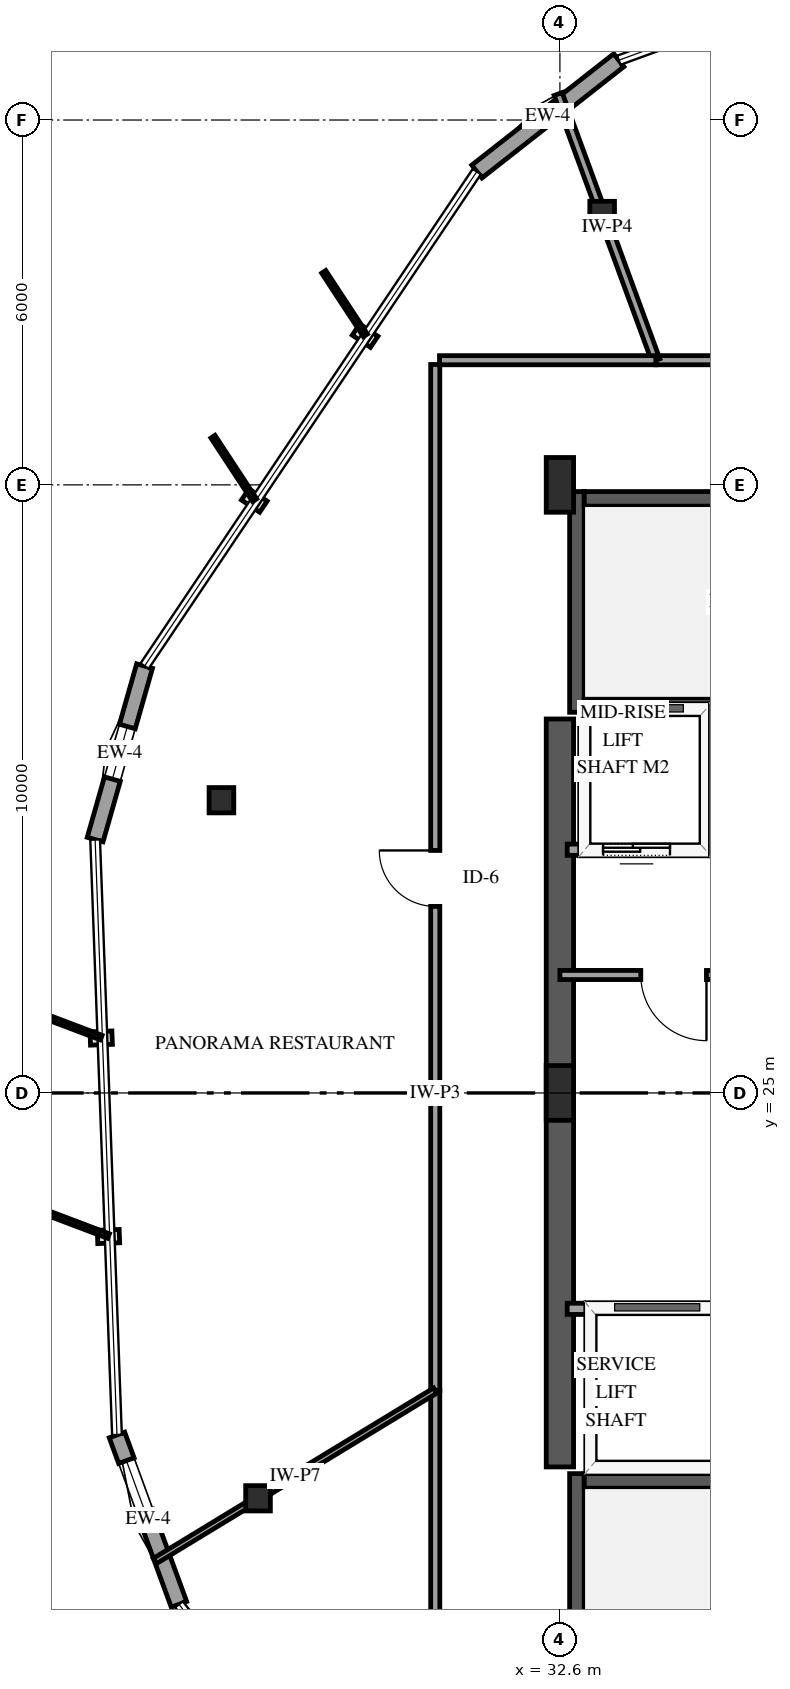
"""IFC4 building model, lengths in metres.
Left out: names, types, materials, properties, quantities, classifications, styles, units other than length and angle.
Written with IfcOpenShell. Run it as: python <this file> out.ifc"""

import sys

from ifc_helpers import new_model, si_unit, direction, frame, frame_2d, origin, origin_2d, place, context, subcontext, project, spatial, rectangle, i_section, extrude, element, fill, save


model = new_model("IFC4")
c1 = context("Model", 3, precision=1e-05, world=origin(), true_north=direction((0.0, 1.0)))
c2 = subcontext(c1, "Body", "Model", "MODEL_VIEW")
j1 = project(units=[si_unit("LENGTHUNIT", "METRE"), si_unit("PLANEANGLEUNIT", "RADIAN")], contexts=[c1])
p1 = place(None, origin())
s1 = spatial("IfcSite", under=j1, at=p1, CompositionType="ELEMENT")
p2 = place(p1, origin())
s2 = spatial("IfcBuilding", under=s1, at=p2, CompositionType="ELEMENT")
p3 = place(p2, frame((0.0, 0.0, 237.4)))
s3 = spatial("IfcBuildingStorey", under=s2, at=p3, CompositionType="ELEMENT", Elevation=237.4)
p4 = place(p3, frame((32.88, 15.11, 0.0), z_axis=(0.0, 0.0, 1.0), x_axis=(0.0, 1.0, 0.0)))
e1 = element("IfcWall", 1, at=p4, inside=s3, PredefinedType="SHEAR", context=c2, shape_type="SweptSolid", body=[
    extrude(rectangle(XDim=3.63, YDim=0.24, at=frame_2d((1.815, 0.0))), origin(), (0.0, 0.0, 1.0), 5.1),
])
p5 = place(p3, frame((33.0, 18.62, 0.0), z_axis=(0.0, 0.0, 1.0), x_axis=(1.0, 0.0, 0.0)))
e2 = element("IfcWall", 2, at=p5, inside=s3, PredefinedType="SHEAR", context=c2, shape_type="SweptSolid", body=[
    extrude(rectangle(XDim=8.0, YDim=0.24, at=frame_2d((4.0, 0.0))), origin(), (0.0, 0.0, 1.0), 5.1),
])
p6 = place(p3, frame((32.88, 31.26, 0.0), z_axis=(0.0, 0.0, 1.0), x_axis=(0.0, 1.0, 0.0)))
e3 = element("IfcWall", 3, at=p6, inside=s3, PredefinedType="SHEAR", context=c2, shape_type="SweptSolid", body=[
    extrude(rectangle(XDim=3.63, YDim=0.24, at=frame_2d((1.815, 0.0))), origin(), (0.0, 0.0, 1.0), 5.1),
])
for number, where, z_axis, x_axis in (
    (4, (33.0, 31.38, 0.0), (0.0, 0.0, 1.0), (1.0, 0.0, 0.0)),
    (5, (33.0, 34.77, 0.0), (0.0, 0.0, 1.0), (1.0, 0.0, 0.0)),
):
    element("IfcWall", number, at=place(p3, frame(where, z_axis=z_axis, x_axis=x_axis)), inside=s3, PredefinedType="SHEAR", context=c2, shape_type="SweptSolid", body=[
        extrude(rectangle(XDim=8.0, YDim=0.24, at=frame_2d((4.0, 0.0))), origin(), (0.0, 0.0, 1.0), 5.1),
    ])
p7 = place(p3, frame((32.6, 18.85, 0.0), z_axis=(0.0, 0.0, 1.0), x_axis=(0.0, 1.0, 0.0)))
e6 = element("IfcWall", 6, at=p7, inside=s3, PredefinedType="SHEAR", context=c2, shape_type="SweptSolid", body=[
    extrude(rectangle(XDim=12.3, YDim=0.45, at=frame_2d((6.15, 0.0))), origin(), (0.0, 0.0, 1.0), 5.1),
])
for number, where, z_axis, x_axis in (
    (7, (32.6, 25.0, 0.0), (0.0, 0.0, 1.0), (1.0, 0.0, 0.0)),
    (8, (32.6, 35.0, 0.0), (0.0, 0.0, 1.0), (1.0, 0.0, 0.0)),
):
    element("IfcColumn", number, at=place(p3, frame(where, z_axis=z_axis, x_axis=x_axis)), inside=s3, PredefinedType="PILASTER", context=c2, shape_type="SweptSolid", body=[
        extrude(rectangle(XDim=0.45, YDim=0.9, at=origin_2d()), origin(), (0.0, 0.0, 1.0), 4.8),
    ])
for number, where, z_axis, x_axis in (
    (9, (33.295, 39.455, 0.0), (0.0, 0.0, 1.0), (1.0, 0.0, 0.0)),
    (10, (27.034, 29.814, 0.0), (0.0, 0.0, 1.0), (1.0, 0.0, 0.0)),
    (11, (27.635, 18.334, 0.0), (0.0, 0.0, 1.0), (1.0, 0.0, 0.0)),
):
    element("IfcColumn", number, at=place(p3, frame(where, z_axis=z_axis, x_axis=x_axis)), inside=s3, PredefinedType="COLUMN", context=c2, shape_type="SweptSolid", body=[
        extrude(i_section(OverallWidth=0.406, OverallDepth=0.416, WebThickness=0.03, FlangeThickness=0.048, FilletRadius=0.038, at=origin_2d()), origin(), (0.0, 0.0, 1.0), 4.8),
    ])
p8 = place(p3, frame((33.569, 41.983, 0.0), z_axis=(0.0, 0.0, 1.0), x_axis=(-0.78691766732, -0.617058007694, 0.0)))
e12 = element("IfcWall", 12, at=p8, inside=s3, PredefinedType="SOLIDWALL", context=c2, shape_type="SweptSolid", body=[
    extrude(rectangle(XDim=2.967, YDim=0.27, at=frame_2d((1.483, 0.0))), origin(), (0.0, 0.0, 1.0), 4.179),
])
p9 = place(p3, frame((25.77, 32.02, 0.0), z_axis=(0.0, 0.0, 1.0), x_axis=(-0.27397104283, -0.961737941276, 0.0)))
e13 = element("IfcWall", 13, at=p9, inside=s3, PredefinedType="SOLIDWALL", context=c2, shape_type="SweptSolid", body=[
    extrude(rectangle(XDim=2.967, YDim=0.27, at=frame_2d((1.483, 0.0))), origin(), (0.0, 0.0, 1.0), 4.179),
])
p10 = place(p9, frame((1.033, 0.0, 0.75)))
e14 = element("IfcOpeningElement", 14, at=p10, cuts=e13, PredefinedType="OPENING", context=c2, shape_type="SweptSolid", body=[
    extrude(rectangle(XDim=0.9, YDim=1.5, at=frame_2d((0.45, 0.75))), frame((0.0, 0.145, 0.0), z_axis=(0.0, -1.0, 0.0), x_axis=(1.0, 0.0, 0.0)), (0.0, 0.0, 1.0), 0.29),
])
p11 = place(p3, frame((25.316, 19.376, 0.0), z_axis=(0.0, 0.0, 1.0), x_axis=(0.343572680233, -0.939126090255, 0.0)))
e15 = element("IfcWall", 15, at=p11, inside=s3, PredefinedType="SOLIDWALL", context=c2, shape_type="SweptSolid", body=[
    extrude(rectangle(XDim=2.967, YDim=0.27, at=frame_2d((1.483, 0.0))), origin(), (0.0, 0.0, 1.0), 4.179),
])
p12 = place(p11, frame((0.45, 0.0, 0.75)))
e16 = element("IfcOpeningElement", 16, at=p12, cuts=e15, PredefinedType="OPENING", context=c2, shape_type="SweptSolid", body=[
    extrude(rectangle(XDim=0.9, YDim=1.5, at=frame_2d((0.45, 0.75))), frame((0.0, 0.145, 0.0), z_axis=(0.0, -1.0, 0.0), x_axis=(1.0, 0.0, 0.0)), (0.0, 0.0, 1.0), 0.29),
])
p13 = place(p3, frame((32.72, 21.45, 0.0), z_axis=(0.0, 0.0, 1.0), x_axis=(1.0, 0.0, 0.0)))
e17 = element("IfcWall", 17, at=p13, inside=s3, PredefinedType="SOLIDWALL", context=c2, shape_type="SweptSolid", body=[
    extrude(rectangle(XDim=2.58, YDim=0.185, at=frame_2d((1.29, 0.0))), origin(), (0.0, 0.0, 1.0), 4.8),
])
p14 = place(p3, frame((32.72, 29.0, 0.0), z_axis=(0.0, 0.0, 1.0), x_axis=(1.0, 0.0, 0.0)))
e18 = element("IfcWall", 18, at=p14, inside=s3, PredefinedType="SOLIDWALL", context=c2, shape_type="SweptSolid", body=[
    extrude(rectangle(XDim=2.28, YDim=0.185, at=frame_2d((1.14, 0.0))), origin(), (0.0, 0.0, 1.0), 4.8),
])
p15 = place(p14, frame((0.59, 0.0, 0.0)))
e19 = element("IfcOpeningElement", 19, at=p15, cuts=e18, PredefinedType="OPENING", context=c2, shape_type="SweptSolid", body=[
    extrude(rectangle(XDim=1.1, YDim=2.15, at=frame_2d((0.55, 1.075))), frame((0.0, 0.103, 0.0), z_axis=(0.0, -1.0, 0.0), x_axis=(1.0, 0.0, 0.0)), (0.0, 0.0, 1.0), 0.205),
])
p16 = place(p3, frame((35.0, 29.11, 0.0), z_axis=(0.0, 0.0, 1.0), x_axis=(0.0, 1.0, 0.0)))
e20 = element("IfcWall", 20, at=p16, inside=s3, PredefinedType="SOLIDWALL", context=c2, shape_type="SweptSolid", body=[
    extrude(rectangle(XDim=2.1, YDim=0.185, at=frame_2d((1.05, 0.0))), origin(), (0.0, 0.0, 1.0), 4.8),
])
p17 = place(p3, frame((30.55, 20.106, 0.0), z_axis=(0.0, 0.0, 1.0), x_axis=(0.0, 1.0, 0.0)))
e21 = element("IfcWall", 21, at=p17, inside=s3, PredefinedType="PARTITIONING", context=c2, shape_type="SweptSolid", body=[
    extrude(rectangle(XDim=16.874, YDim=0.15, at=frame_2d((8.437, 0.0))), origin(), (0.0, 0.0, 1.0), 4.8),
])
p18 = place(p17, frame((7.962, 0.0, 0.0)))
e22 = element("IfcOpeningElement", 22, at=p18, cuts=e21, PredefinedType="OPENING", context=c2, shape_type="SweptSolid", body=[
    extrude(rectangle(XDim=0.92, YDim=2.12, at=frame_2d((0.46, 1.06))), frame((0.0, 0.085, 0.0), z_axis=(0.0, -1.0, 0.0), x_axis=(1.0, 0.0, 0.0)), (0.0, 0.0, 1.0), 0.17),
])
p19 = place(p3, frame((30.55, 13.02, 0.0), z_axis=(0.0, 0.0, 1.0), x_axis=(0.0, 1.0, 0.0)))
e23 = element("IfcWall", 23, at=p19, inside=s3, PredefinedType="PARTITIONING", context=c2, shape_type="SweptSolid", body=[
    extrude(rectangle(XDim=7.086, YDim=0.15, at=frame_2d((3.543, 0.0))), origin(), (0.0, 0.0, 1.0), 4.8),
])
p20 = place(p3, frame((34.177, 37.05, 0.0), z_axis=(0.0, 0.0, 1.0), x_axis=(1.0, 0.0, 0.0)))
e24 = element("IfcWall", 24, at=p20, inside=s3, PredefinedType="PARTITIONING", context=c2, shape_type="SweptSolid", body=[
    extrude(rectangle(XDim=6.953, YDim=0.15, at=frame_2d((3.477, 0.0))), origin(), (0.0, 0.0, 1.0), 4.8),
])
p21 = place(p3, frame((30.55, 20.106, 0.0), z_axis=(0.0, 0.0, 1.0), x_axis=(-0.854508553668, -0.519437322214, 0.0)))
e25 = element("IfcWall", 25, at=p21, inside=s3, PredefinedType="PARTITIONING", context=c2, shape_type="SweptSolid", body=[
    extrude(rectangle(XDim=5.396, YDim=0.1, at=frame_2d((2.698, 0.0))), origin(), (0.0, 0.0, 1.0), 4.8),
])
p22 = place(p3, frame((34.177, 37.05, 0.0), z_axis=(0.0, 0.0, 1.0), x_axis=(-0.344390019459, 0.938826669038, 0.0)))
e26 = element("IfcWall", 26, at=p22, inside=s3, PredefinedType="PARTITIONING", context=c2, shape_type="SweptSolid", body=[
    extrude(rectangle(XDim=4.663, YDim=0.14, at=frame_2d((2.332, 0.0))), origin(), (0.0, 0.0, 1.0), 3.09),
])
p23 = place(p3, frame((36.34, 26.94, 0.0), z_axis=(0.0, 0.0, 1.0), x_axis=(-1.0, 0.0, 0.0)))
e27 = element("IfcWall", 27, at=p23, inside=s3, PredefinedType="PARTITIONING", context=c2, shape_type="SweptSolid", body=[
    extrude(rectangle(XDim=3.74, YDim=0.15, at=frame_2d((1.87, 0.0))), origin(), (0.0, 0.0, 1.0), 4.8),
])
p24 = place(p23, frame((1.33, 0.0, 0.0)))
e28 = element("IfcOpeningElement", 28, at=p24, cuts=e27, PredefinedType="OPENING", context=c2, shape_type="SweptSolid", body=[
    extrude(rectangle(XDim=1.08, YDim=2.15, at=frame_2d((0.54, 1.075))), frame((0.0, 0.085, 0.0), z_axis=(0.0, -1.0, 0.0), x_axis=(1.0, 0.0, 0.0)), (0.0, 0.0, 1.0), 0.17),
])
p25 = place(p3, frame((30.62, 37.05, 0.0), z_axis=(0.0, 0.0, 1.0), x_axis=(1.0, 0.0, 0.0)))
e29 = element("IfcWall", 29, at=p25, inside=s3, PredefinedType="PARTITIONING", context=c2, shape_type="SweptSolid", body=[
    extrude(rectangle(XDim=3.557, YDim=0.15, at=frame_2d((1.778, 0.0))), origin(), (0.0, 0.0, 1.0), 4.8),
])
p26 = place(p10, origin())
e30 = element("IfcWindow", 30, at=p26, inside=s3, PartitioningType="SINGLE_PANEL", PredefinedType="WINDOW", context=c2, shape_type="SweptSolid", body=[
    extrude(rectangle(XDim=0.9, YDim=1.5, at=frame_2d((0.45, 0.75))), frame((0.0, 0.03, 0.0), z_axis=(0.0, -1.0, 0.0), x_axis=(1.0, 0.0, 0.0)), (0.0, 0.0, 1.0), 0.06),
])
fill(e14, e30)
p27 = place(p12, origin())
e31 = element("IfcWindow", 31, at=p27, inside=s3, PartitioningType="SINGLE_PANEL", PredefinedType="WINDOW", context=c2, shape_type="SweptSolid", body=[
    extrude(rectangle(XDim=0.9, YDim=1.5, at=frame_2d((0.45, 0.75))), frame((0.0, 0.03, 0.0), z_axis=(0.0, -1.0, 0.0), x_axis=(1.0, 0.0, 0.0)), (0.0, 0.0, 1.0), 0.06),
])
fill(e16, e31)
p28 = place(p15, origin())
e32 = element("IfcDoor", 32, at=p28, inside=s3, OperationType="SLIDING_TO_LEFT", PredefinedType="DOOR", context=c2, shape_type="SweptSolid", body=[
    extrude(rectangle(XDim=1.1, YDim=2.15, at=frame_2d((0.55, 1.075))), frame((0.0, 0.025, 0.0), z_axis=(0.0, -1.0, 0.0), x_axis=(1.0, 0.0, 0.0)), (0.0, 0.0, 1.0), 0.05),
])
fill(e19, e32)
p29 = place(p18, origin())
e33 = element("IfcDoor", 33, at=p29, inside=s3, OperationType="SINGLE_SWING_RIGHT", PredefinedType="DOOR", context=c2, shape_type="SweptSolid", body=[
    extrude(rectangle(XDim=0.92, YDim=2.12, at=frame_2d((0.46, 1.06))), frame((0.0, 0.025, 0.0), z_axis=(0.0, -1.0, 0.0), x_axis=(1.0, 0.0, 0.0)), (0.0, 0.0, 1.0), 0.05),
])
fill(e22, e33)
p30 = place(p24, origin())
e34 = element("IfcDoor", 34, at=p30, inside=s3, OperationType="SINGLE_SWING_LEFT", PredefinedType="DOOR", context=c2, shape_type="SweptSolid", body=[
    extrude(rectangle(XDim=1.08, YDim=2.15, at=frame_2d((0.54, 1.075))), frame((0.0, 0.025, 0.0), z_axis=(0.0, -1.0, 0.0), x_axis=(1.0, 0.0, 0.0)), (0.0, 0.0, 1.0), 0.05),
])
fill(e28, e34)
save(model, sys.argv[1])
